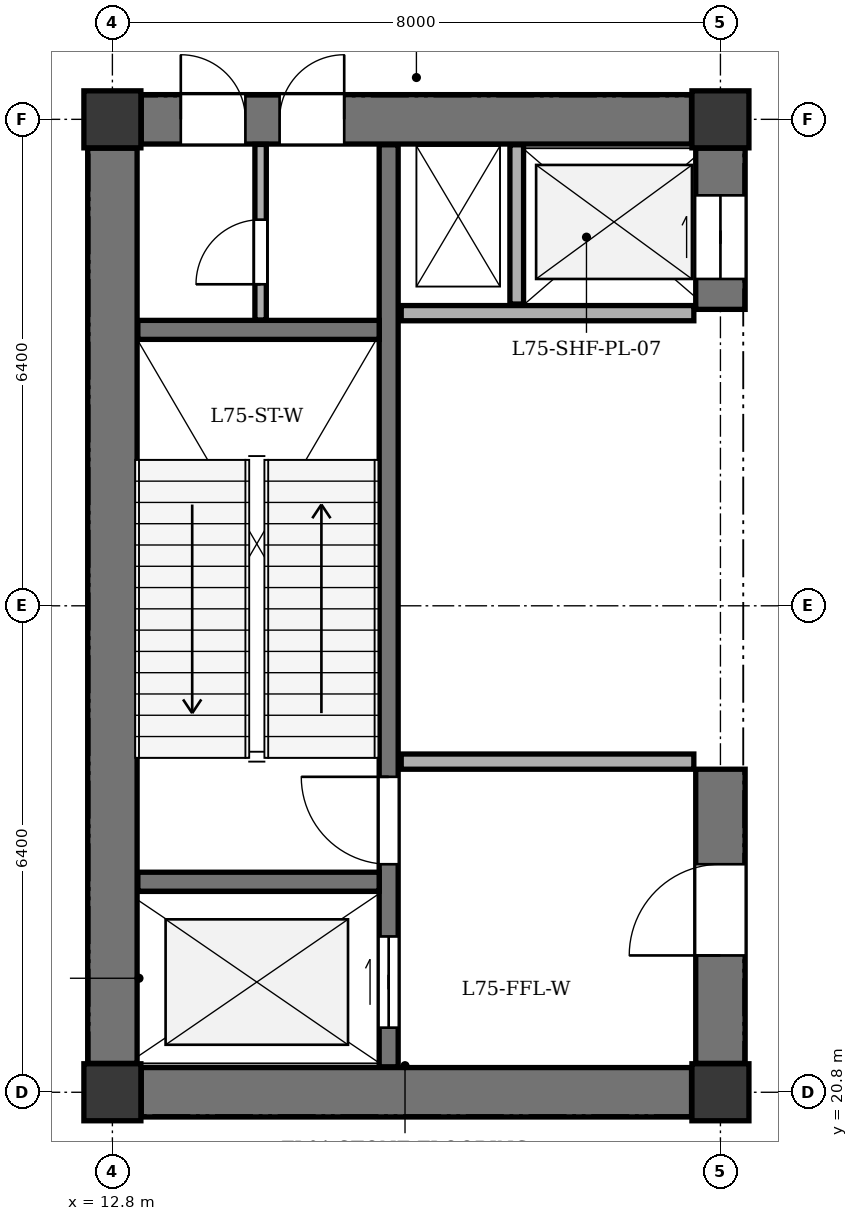
"""IFC4 building model, lengths in metres.
Left out: names, types, materials, properties, quantities, classifications, styles, units other than length and angle.
Written with IfcOpenShell. Run it as: python <this file> out.ifc"""

import sys

from ifc_helpers import new_model, si_unit, direction, frame, frame_2d, origin, origin_2d, place, context, subcontext, project, spatial, rectangle, extrude, element, fill, save


model = new_model("IFC4")
c1 = context("Model", 3, precision=1e-05, world=origin(), true_north=direction((0.0, 1.0)))
c2 = subcontext(c1, "Body", "Model", "MODEL_VIEW")
j1 = project(units=[si_unit("LENGTHUNIT", "METRE"), si_unit("PLANEANGLEUNIT", "RADIAN")], contexts=[c1])
p1 = place(None, origin())
s1 = spatial("IfcSite", under=j1, at=p1, CompositionType="ELEMENT")
p2 = place(p1, origin())
s2 = spatial("IfcBuilding", under=s1, at=p2, CompositionType="ELEMENT")
p3 = place(p2, frame((0.0, 0.0, 282.3)))
s3 = spatial("IfcBuildingStorey", under=s2, at=p3, CompositionType="ELEMENT", Elevation=282.3)
for number, where, z_axis, x_axis in (
    (1, (12.8, 20.8, 0.0), (0.0, 0.0, 1.0), (1.0, 0.0, 0.0)),
    (2, (20.8, 20.8, 0.0), (0.0, 0.0, 1.0), (1.0, 0.0, 0.0)),
    (3, (12.8, 33.6, 0.0), (0.0, 0.0, 1.0), (1.0, 0.0, 0.0)),
    (4, (20.8, 33.6, 0.0), (0.0, 0.0, 1.0), (1.0, 0.0, 0.0)),
):
    element("IfcColumn", number, at=place(p3, frame(where, z_axis=z_axis, x_axis=x_axis)), inside=s3, PredefinedType="COLUMN", context=c2, shape_type="SweptSolid", body=[
        extrude(rectangle(XDim=0.75, YDim=0.75, at=origin_2d()), origin(), (0.0, 0.0, 1.0), 5.1),
    ])
p4 = place(p3, frame((12.8, 21.18, 0.0), z_axis=(0.0, 0.0, 1.0), x_axis=(0.0, 1.0, 0.0)))
e5 = element("IfcWall", 5, at=p4, inside=s3, PredefinedType="SHEAR", context=c2, shape_type="SweptSolid", body=[
    extrude(rectangle(XDim=12.04, YDim=0.65, at=frame_2d((6.02, 0.0))), origin(), (0.0, 0.0, 1.0), 4.65),
])
p5 = place(p3, frame((13.18, 20.8, 0.0), z_axis=(0.0, 0.0, 1.0), x_axis=(1.0, 0.0, 0.0)))
e6 = element("IfcWall", 6, at=p5, inside=s3, PredefinedType="SHEAR", context=c2, shape_type="SweptSolid", body=[
    extrude(rectangle(XDim=7.24, YDim=0.65, at=frame_2d((3.62, 0.0))), origin(), (0.0, 0.0, 1.0), 4.65),
])
p6 = place(p3, frame((13.18, 33.6, 0.0), z_axis=(0.0, 0.0, 1.0), x_axis=(1.0, 0.0, 0.0)))
e7 = element("IfcWall", 7, at=p6, inside=s3, PredefinedType="SHEAR", context=c2, shape_type="SweptSolid", body=[
    extrude(rectangle(XDim=7.24, YDim=0.65, at=frame_2d((3.62, 0.0))), origin(), (0.0, 0.0, 1.0), 4.65),
])
p7 = place(p6, frame((0.52, 0.0, 0.0)))
e8 = element("IfcOpeningElement", 8, at=p7, cuts=e7, PredefinedType="OPENING", context=c2, shape_type="SweptSolid", body=[
    extrude(rectangle(XDim=0.85, YDim=2.02, at=frame_2d((0.425, 1.01))), frame((0.0, 0.335, 0.0), z_axis=(0.0, -1.0, 0.0), x_axis=(1.0, 0.0, 0.0)), (0.0, 0.0, 1.0), 0.67),
])
p8 = place(p6, frame((1.82, 0.0, 0.0)))
e9 = element("IfcOpeningElement", 9, at=p8, cuts=e7, PredefinedType="OPENING", context=c2, shape_type="SweptSolid", body=[
    extrude(rectangle(XDim=0.85, YDim=2.02, at=frame_2d((0.425, 1.01))), frame((0.0, 0.335, 0.0), z_axis=(0.0, -1.0, 0.0), x_axis=(1.0, 0.0, 0.0)), (0.0, 0.0, 1.0), 0.67),
])
p9 = place(p3, frame((20.8, 21.18, 0.0), z_axis=(0.0, 0.0, 1.0), x_axis=(0.0, 1.0, 0.0)))
e10 = element("IfcWall", 10, at=p9, inside=s3, PredefinedType="SHEAR", context=c2, shape_type="SweptSolid", body=[
    extrude(rectangle(XDim=3.87, YDim=0.65, at=frame_2d((1.935, 0.0))), origin(), (0.0, 0.0, 1.0), 4.65),
])
p10 = place(p9, frame((1.42, 0.0, 0.0)))
e11 = element("IfcOpeningElement", 11, at=p10, cuts=e10, PredefinedType="OPENING", context=c2, shape_type="SweptSolid", body=[
    extrude(rectangle(XDim=1.2, YDim=2.15, at=frame_2d((0.6, 1.075))), frame((0.0, 0.335, 0.0), z_axis=(0.0, -1.0, 0.0), x_axis=(1.0, 0.0, 0.0)), (0.0, 0.0, 1.0), 0.67),
])
p11 = place(p3, frame((20.8, 31.1, 0.0), z_axis=(0.0, 0.0, 1.0), x_axis=(0.0, 1.0, 0.0)))
e12 = element("IfcWall", 12, at=p11, inside=s3, PredefinedType="SHEAR", context=c2, shape_type="SweptSolid", body=[
    extrude(rectangle(XDim=2.12, YDim=0.65, at=frame_2d((1.06, 0.0))), origin(), (0.0, 0.0, 1.0), 4.65),
])
p12 = place(p11, frame((0.4, 0.0, 0.0)))
e13 = element("IfcOpeningElement", 13, at=p12, cuts=e12, PredefinedType="OPENING", context=c2, shape_type="SweptSolid", body=[
    extrude(rectangle(XDim=1.1, YDim=2.1, at=frame_2d((0.55, 1.05))), frame((0.0, 0.335, 0.0), z_axis=(0.0, -1.0, 0.0), x_axis=(1.0, 0.0, 0.0)), (0.0, 0.0, 1.0), 0.67),
])
p13 = place(p3, frame((16.435, 21.135, 0.0), z_axis=(0.0, 0.0, 1.0), x_axis=(0.0, 1.0, 0.0)))
e14 = element("IfcWall", 14, at=p13, inside=s3, PredefinedType="SHEAR", context=c2, shape_type="SweptSolid", body=[
    extrude(rectangle(XDim=12.13, YDim=0.25, at=frame_2d((6.065, 0.0))), origin(), (0.0, 0.0, 1.0), 4.65),
])
p14 = place(p13, frame((0.515, 0.0, 0.0)))
e15 = element("IfcOpeningElement", 15, at=p14, cuts=e14, PredefinedType="OPENING", context=c2, shape_type="SweptSolid", body=[
    extrude(rectangle(XDim=1.2, YDim=2.15, at=frame_2d((0.6, 1.075))), frame((0.0, 0.135, 0.0), z_axis=(0.0, -1.0, 0.0), x_axis=(1.0, 0.0, 0.0)), (0.0, 0.0, 1.0), 0.27),
])
p15 = place(p13, frame((2.665, 0.0, 0.0)))
e16 = element("IfcOpeningElement", 16, at=p15, cuts=e14, PredefinedType="OPENING", context=c2, shape_type="SweptSolid", body=[
    extrude(rectangle(XDim=1.15, YDim=2.15, at=frame_2d((0.575, 1.075))), frame((0.0, 0.135, 0.0), z_axis=(0.0, -1.0, 0.0), x_axis=(1.0, 0.0, 0.0)), (0.0, 0.0, 1.0), 0.27),
])
for number, where, z_axis, x_axis in (
    (17, (13.135, 23.57, 0.0), (0.0, 0.0, 1.0), (1.0, 0.0, 0.0)),
    (18, (13.135, 30.83, 0.0), (0.0, 0.0, 1.0), (1.0, 0.0, 0.0)),
):
    element("IfcWall", number, at=place(p3, frame(where, z_axis=z_axis, x_axis=x_axis)), inside=s3, PredefinedType="SHEAR", context=c2, shape_type="SweptSolid", body=[
        extrude(rectangle(XDim=3.175, YDim=0.25, at=frame_2d((1.587, 0.0))), origin(), (0.0, 0.0, 1.0), 4.65),
    ])
for number, where, z_axis, x_axis in (
    (19, (16.6, 25.15, 0.0), (0.0, 0.0, 1.0), (1.0, 0.0, 0.0)),
    (20, (16.6, 31.05, 0.0), (0.0, 0.0, 1.0), (1.0, 0.0, 0.0)),
):
    element("IfcWall", number, at=place(p3, frame(where, z_axis=z_axis, x_axis=x_axis)), inside=s3, PredefinedType="SOLIDWALL", context=c2, shape_type="SweptSolid", body=[
        extrude(rectangle(XDim=3.85, YDim=0.2, at=frame_2d((1.925, 0.0))), origin(), (0.0, 0.0, 1.0), 4.65),
    ])
p16 = place(p3, frame((18.12, 31.17, 0.0), z_axis=(0.0, 0.0, 1.0), x_axis=(0.0, 1.0, 0.0)))
e21 = element("IfcWall", 21, at=p16, inside=s3, PredefinedType="PARTITIONING", context=c2, shape_type="SweptSolid", body=[
    extrude(rectangle(XDim=2.095, YDim=0.18, at=frame_2d((1.047, 0.0))), origin(), (0.0, 0.0, 1.0), 4.65),
])
p17 = place(p3, frame((14.75, 30.96, 0.0), z_axis=(0.0, 0.0, 1.0), x_axis=(0.0, 1.0, 0.0)))
e22 = element("IfcWall", 22, at=p17, inside=s3, PredefinedType="PARTITIONING", context=c2, shape_type="SweptSolid", body=[
    extrude(rectangle(XDim=2.31, YDim=0.15, at=frame_2d((1.155, 0.0))), origin(), (0.0, 0.0, 1.0), 4.65),
])
p18 = place(p17, frame((0.47, 0.0, 0.0)))
e23 = element("IfcOpeningElement", 23, at=p18, cuts=e22, PredefinedType="OPENING", context=c2, shape_type="SweptSolid", body=[
    extrude(rectangle(XDim=0.85, YDim=2.02, at=frame_2d((0.425, 1.01))), frame((0.0, 0.085, 0.0), z_axis=(0.0, -1.0, 0.0), x_axis=(1.0, 0.0, 0.0)), (0.0, 0.0, 1.0), 0.17),
])
p19 = place(p7, origin())
e24 = element("IfcDoor", 24, at=p19, inside=s3, OperationType="SINGLE_SWING_LEFT", PredefinedType="DOOR", context=c2, shape_type="SweptSolid", body=[
    extrude(rectangle(XDim=0.85, YDim=2.02, at=frame_2d((0.425, 1.01))), frame((0.0, 0.025, 0.0), z_axis=(0.0, -1.0, 0.0), x_axis=(1.0, 0.0, 0.0)), (0.0, 0.0, 1.0), 0.05),
])
fill(e8, e24)
p20 = place(p8, origin())
e25 = element("IfcDoor", 25, at=p20, inside=s3, OperationType="SINGLE_SWING_RIGHT", PredefinedType="DOOR", context=c2, shape_type="SweptSolid", body=[
    extrude(rectangle(XDim=0.85, YDim=2.02, at=frame_2d((0.425, 1.01))), frame((0.0, 0.025, 0.0), z_axis=(0.0, -1.0, 0.0), x_axis=(1.0, 0.0, 0.0)), (0.0, 0.0, 1.0), 0.05),
])
fill(e9, e25)
p21 = place(p10, origin())
e26 = element("IfcDoor", 26, at=p21, inside=s3, OperationType="SINGLE_SWING_LEFT", PredefinedType="DOOR", context=c2, shape_type="SweptSolid", body=[
    extrude(rectangle(XDim=1.2, YDim=2.15, at=frame_2d((0.6, 1.075))), frame((0.0, 0.025, 0.0), z_axis=(0.0, -1.0, 0.0), x_axis=(1.0, 0.0, 0.0)), (0.0, 0.0, 1.0), 0.05),
])
fill(e11, e26)
p22 = place(p12, origin())
e27 = element("IfcDoor", 27, at=p22, inside=s3, OperationType="DOUBLE_DOOR_SLIDING", PredefinedType="DOOR", context=c2, shape_type="SweptSolid", body=[
    extrude(rectangle(XDim=1.1, YDim=2.1, at=frame_2d((0.55, 1.05))), frame((0.0, 0.025, 0.0), z_axis=(0.0, -1.0, 0.0), x_axis=(1.0, 0.0, 0.0)), (0.0, 0.0, 1.0), 0.05),
])
fill(e13, e27)
p23 = place(p14, origin())
e28 = element("IfcDoor", 28, at=p23, inside=s3, OperationType="DOUBLE_DOOR_SLIDING", PredefinedType="DOOR", context=c2, shape_type="SweptSolid", body=[
    extrude(rectangle(XDim=1.2, YDim=2.15, at=frame_2d((0.6, 1.075))), frame((0.0, 0.025, 0.0), z_axis=(0.0, -1.0, 0.0), x_axis=(1.0, 0.0, 0.0)), (0.0, 0.0, 1.0), 0.05),
])
fill(e15, e28)
p24 = place(p15, origin())
e29 = element("IfcDoor", 29, at=p24, inside=s3, OperationType="SINGLE_SWING_RIGHT", PredefinedType="DOOR", context=c2, shape_type="SweptSolid", body=[
    extrude(rectangle(XDim=1.15, YDim=2.15, at=frame_2d((0.575, 1.075))), frame((0.0, 0.025, 0.0), z_axis=(0.0, -1.0, 0.0), x_axis=(1.0, 0.0, 0.0)), (0.0, 0.0, 1.0), 0.05),
])
fill(e16, e29)
p25 = place(p18, origin())
e30 = element("IfcDoor", 30, at=p25, inside=s3, OperationType="SINGLE_SWING_LEFT", PredefinedType="DOOR", context=c2, shape_type="SweptSolid", body=[
    extrude(rectangle(XDim=0.85, YDim=2.02, at=frame_2d((0.425, 1.01))), frame((0.0, 0.025, 0.0), z_axis=(0.0, -1.0, 0.0), x_axis=(1.0, 0.0, 0.0)), (0.0, 0.0, 1.0), 0.05),
])
fill(e23, e30)
save(model, sys.argv[1])
